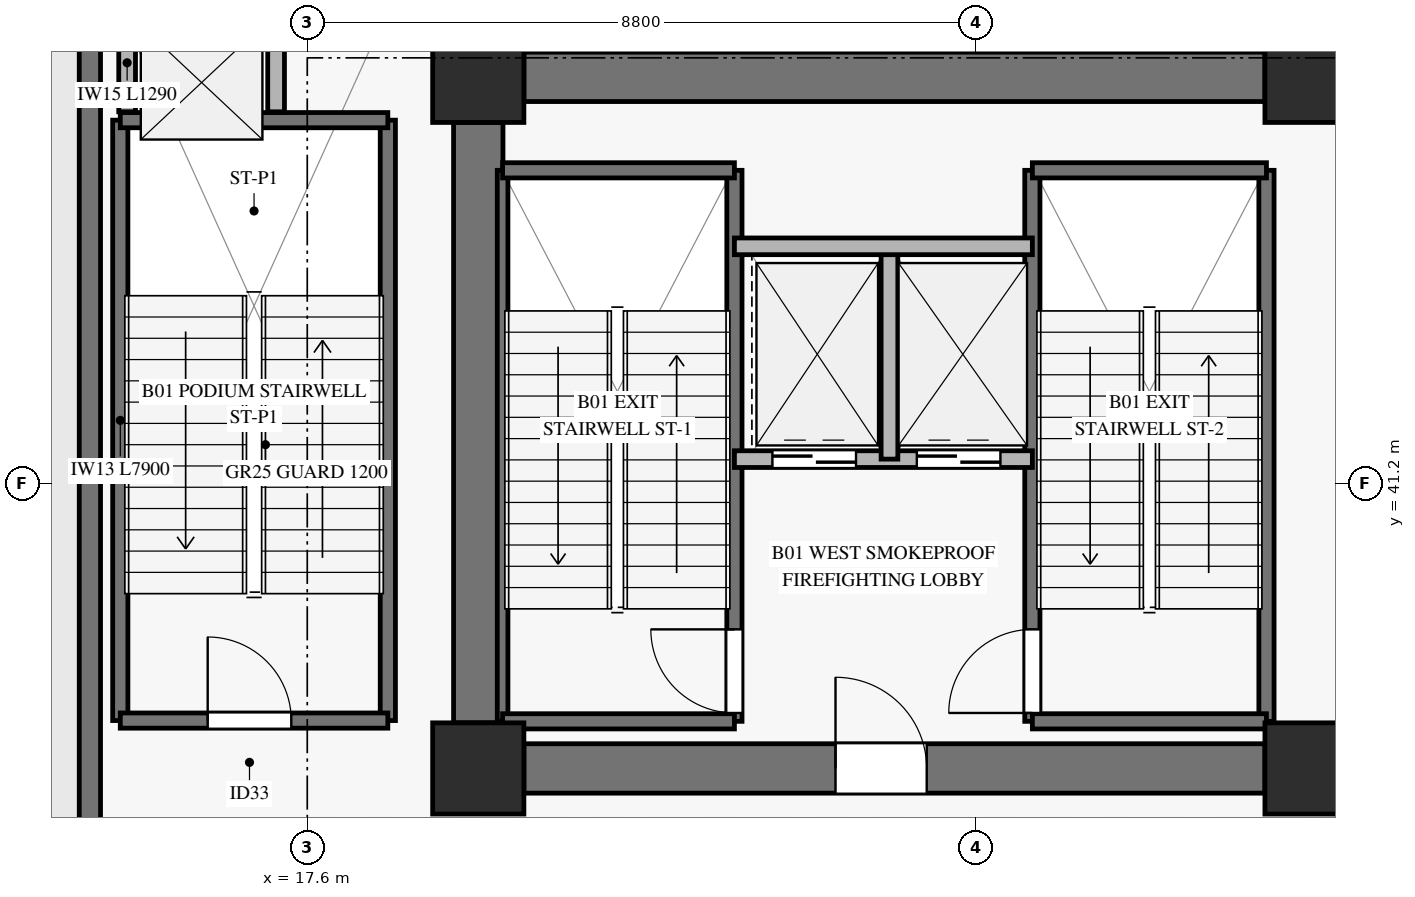
"""IFC4 building model, lengths in metres.
Left out: names, types, materials, properties, quantities, classifications, styles, units other than length and angle.
Written with IfcOpenShell. Run it as: python <this file> out.ifc"""

import sys

from ifc_helpers import new_model, si_unit, direction, frame, frame_2d, origin, origin_2d, place, context, subcontext, project, spatial, rectangle, extrude, source, transform, mapped, element, fill, save


model = new_model("IFC4")
c1 = context("Model", 3, precision=1e-05, world=origin(), true_north=direction((0.0, 1.0)))
c2 = subcontext(c1, "Body", "Model", "MODEL_VIEW")
j1 = project(units=[si_unit("LENGTHUNIT", "METRE"), si_unit("PLANEANGLEUNIT", "RADIAN")], contexts=[c1])
p1 = place(None, origin())
s1 = spatial("IfcSite", under=j1, at=p1, CompositionType="ELEMENT")
p2 = place(p1, origin())
s2 = spatial("IfcBuilding", under=s1, at=p2, CompositionType="ELEMENT")
p3 = place(p2, frame((0.0, 0.0, -5.2)))
s3 = spatial("IfcBuildingStorey", under=s2, at=p3, CompositionType="ELEMENT", Elevation=-5.2)
m1 = source(origin(), c2, "Body", "SweptSolid", [
    extrude(rectangle(XDim=1.2, YDim=1.2, at=origin_2d()), origin(), (0.0, 0.0, 1.0), 4.94),
])
for number, where, z_axis, x_axis in (
    (1, (19.85, 37.45, 0.0), (0.0, 0.0, 1.0), (1.0, 0.0, 0.0)),
    (2, (19.85, 46.55, 0.0), (0.0, 0.0, 1.0), (1.0, 0.0, 0.0)),
    (3, (30.8, 37.45, 0.0), (0.0, 0.0, 1.0), (1.0, 0.0, 0.0)),
    (4, (30.8, 46.55, 0.0), (0.0, 0.0, 1.0), (1.0, 0.0, 0.0)),
):
    element("IfcColumn", number, at=place(p3, frame(where, z_axis=z_axis, x_axis=x_axis)), inside=s3, PredefinedType="PILASTER", context=c2, shape_type="MappedRepresentation", body=[
        mapped(m1, transform((0.0, 0.0, 0.0), x_axis=(1.0, 0.0, 0.0), y_axis=(0.0, 1.0, 0.0), z_axis=(0.0, 0.0, 1.0), scale=1.0)),
    ])
p4 = place(p3, frame((20.45, 46.55, 0.0), z_axis=(0.0, 0.0, 1.0), x_axis=(1.0, 0.0, 0.0)))
e5 = element("IfcWall", 5, at=p4, inside=s3, PredefinedType="SHEAR", context=c2, shape_type="SweptSolid", body=[
    extrude(rectangle(XDim=9.75, YDim=0.65, at=frame_2d((4.875, 0.0))), origin(), (0.0, 0.0, 1.0), 4.94),
])
p5 = place(p3, frame((20.45, 37.45, 0.0), z_axis=(0.0, 0.0, 1.0), x_axis=(1.0, 0.0, 0.0)))
e6 = element("IfcWall", 6, at=p5, inside=s3, PredefinedType="SHEAR", context=c2, shape_type="SweptSolid", body=[
    extrude(rectangle(XDim=9.75, YDim=0.65, at=frame_2d((4.875, 0.0))), origin(), (0.0, 0.0, 1.0), 4.94),
])
p6 = place(p5, frame((4.1, 0.0, 0.0)))
e7 = element("IfcOpeningElement", 7, at=p6, cuts=e6, PredefinedType="OPENING", context=c2, shape_type="SweptSolid", body=[
    extrude(rectangle(XDim=1.2, YDim=2.15, at=frame_2d((0.6, 1.075))), frame((0.0, 0.335, 0.0), z_axis=(0.0, -1.0, 0.0), x_axis=(1.0, 0.0, 0.0)), (0.0, 0.0, 1.0), 0.67),
])
p7 = place(p3, frame((19.85, 38.05, 0.0), z_axis=(0.0, 0.0, 1.0), x_axis=(0.0, 1.0, 0.0)))
e8 = element("IfcWall", 8, at=p7, inside=s3, PredefinedType="SHEAR", context=c2, shape_type="SweptSolid", body=[
    extrude(rectangle(XDim=7.9, YDim=0.65, at=frame_2d((3.95, 0.0))), origin(), (0.0, 0.0, 1.0), 4.94),
])
p8 = place(p3, frame((14.74, 6.76, 0.0), z_axis=(0.0, 0.0, 1.0), x_axis=(0.0, 1.0, 0.0)))
e9 = element("IfcWall", 9, at=p8, inside=s3, PredefinedType="SOLIDWALL", context=c2, shape_type="SweptSolid", body=[
    extrude(rectangle(XDim=42.0, YDim=0.28, at=frame_2d((21.0, 0.0))), origin(), (0.0, 0.0, 1.0), 5.2),
])
p9 = place(p3, frame((20.17, 38.07, 0.0), z_axis=(0.0, 0.0, 1.0), x_axis=(0.0, 1.0, 0.0)))
e10 = element("IfcWall", 10, at=p9, inside=s3, PredefinedType="SOLIDWALL", context=c2, shape_type="SweptSolid", body=[
    extrude(rectangle(XDim=7.25, YDim=0.14, at=frame_2d((3.625, 0.0))), origin(), (0.0, 0.0, 1.0), 5.2),
])
p10 = place(p3, frame((23.22, 38.07, 0.0), z_axis=(0.0, 0.0, 1.0), x_axis=(0.0, 1.0, 0.0)))
e11 = element("IfcWall", 11, at=p10, inside=s3, PredefinedType="SOLIDWALL", context=c2, shape_type="SweptSolid", body=[
    extrude(rectangle(XDim=7.25, YDim=0.2, at=frame_2d((3.625, 0.0))), origin(), (0.0, 0.0, 1.0), 5.2),
])
p11 = place(p10, frame((0.11, 0.0, 0.0)))
e12 = element("IfcOpeningElement", 12, at=p11, cuts=e11, PredefinedType="OPENING", context=c2, shape_type="SweptSolid", body=[
    extrude(rectangle(XDim=1.1, YDim=2.15, at=frame_2d((0.55, 1.075))), frame((0.0, 0.11, 0.0), z_axis=(0.0, -1.0, 0.0), x_axis=(1.0, 0.0, 0.0)), (0.0, 0.0, 1.0), 0.22),
])
for number, where, z_axis, x_axis in (
    (13, (20.17, 45.32, 0.0), (0.0, 0.0, 1.0), (1.0, 0.0, 0.0)),
    (14, (20.17, 38.07, 0.0), (0.0, 0.0, 1.0), (1.0, 0.0, 0.0)),
):
    element("IfcWall", number, at=place(p3, frame(where, z_axis=z_axis, x_axis=x_axis)), inside=s3, PredefinedType="SOLIDWALL", context=c2, shape_type="SweptSolid", body=[
        extrude(rectangle(XDim=3.05, YDim=0.2, at=frame_2d((1.525, 0.0))), origin(), (0.0, 0.0, 1.0), 5.2),
    ])
p12 = place(p3, frame((27.14, 38.07, 0.0), z_axis=(0.0, 0.0, 1.0), x_axis=(0.0, 1.0, 0.0)))
e15 = element("IfcWall", 15, at=p12, inside=s3, PredefinedType="SOLIDWALL", context=c2, shape_type="SweptSolid", body=[
    extrude(rectangle(XDim=7.25, YDim=0.2, at=frame_2d((3.625, 0.0))), origin(), (0.0, 0.0, 1.0), 5.2),
])
p13 = place(p12, frame((0.11, 0.0, 0.0)))
e16 = element("IfcOpeningElement", 16, at=p13, cuts=e15, PredefinedType="OPENING", context=c2, shape_type="SweptSolid", body=[
    extrude(rectangle(XDim=1.1, YDim=2.15, at=frame_2d((0.55, 1.075))), frame((0.0, 0.11, 0.0), z_axis=(0.0, -1.0, 0.0), x_axis=(1.0, 0.0, 0.0)), (0.0, 0.0, 1.0), 0.22),
])
p14 = place(p3, frame((30.22, 38.07, 0.0), z_axis=(0.0, 0.0, 1.0), x_axis=(0.0, 1.0, 0.0)))
e17 = element("IfcWall", 17, at=p14, inside=s3, PredefinedType="SOLIDWALL", context=c2, shape_type="SweptSolid", body=[
    extrude(rectangle(XDim=7.25, YDim=0.2, at=frame_2d((3.625, 0.0))), origin(), (0.0, 0.0, 1.0), 5.2),
])
for number, where, z_axis, x_axis in (
    (18, (27.14, 45.32, 0.0), (0.0, 0.0, 1.0), (1.0, 0.0, 0.0)),
    (19, (27.14, 38.07, 0.0), (0.0, 0.0, 1.0), (1.0, 0.0, 0.0)),
):
    element("IfcWall", number, at=place(p3, frame(where, z_axis=z_axis, x_axis=x_axis)), inside=s3, PredefinedType="SOLIDWALL", context=c2, shape_type="SweptSolid", body=[
        extrude(rectangle(XDim=3.08, YDim=0.2, at=frame_2d((1.54, 0.0))), origin(), (0.0, 0.0, 1.0), 5.2),
    ])
p15 = place(p3, frame((23.22, 41.52, 0.0), z_axis=(0.0, 0.0, 1.0), x_axis=(1.0, 0.0, 0.0)))
e20 = element("IfcWall", 20, at=p15, inside=s3, PredefinedType="SOLIDWALL", context=c2, shape_type="SweptSolid", body=[
    extrude(rectangle(XDim=3.92, YDim=0.22, at=frame_2d((1.96, 0.0))), origin(), (0.0, 0.0, 1.0), 4.94),
])
p16 = place(p15, frame((0.5, 0.0, 0.0)))
e21 = element("IfcOpeningElement", 21, at=p16, cuts=e20, PredefinedType="OPENING", context=c2, shape_type="SweptSolid", body=[
    extrude(rectangle(XDim=1.1, YDim=2.2, at=frame_2d((0.55, 1.1))), frame((0.0, 0.12, 0.0), z_axis=(0.0, -1.0, 0.0), x_axis=(1.0, 0.0, 0.0)), (0.0, 0.0, 1.0), 0.24),
])
p17 = place(p15, frame((2.4, 0.0, 0.0)))
e22 = element("IfcOpeningElement", 22, at=p17, cuts=e20, PredefinedType="OPENING", context=c2, shape_type="SweptSolid", body=[
    extrude(rectangle(XDim=1.1, YDim=2.2, at=frame_2d((0.55, 1.1))), frame((0.0, 0.12, 0.0), z_axis=(0.0, -1.0, 0.0), x_axis=(1.0, 0.0, 0.0)), (0.0, 0.0, 1.0), 0.24),
])
p18 = place(p3, frame((25.26, 41.52, 0.0), z_axis=(0.0, 0.0, 1.0), x_axis=(0.0, 1.0, 0.0)))
e23 = element("IfcWall", 23, at=p18, inside=s3, PredefinedType="SOLIDWALL", context=c2, shape_type="SweptSolid", body=[
    extrude(rectangle(XDim=2.8, YDim=0.22, at=frame_2d((1.4, 0.0))), origin(), (0.0, 0.0, 1.0), 4.94),
])
p19 = place(p3, frame((23.22, 44.32, 0.0), z_axis=(0.0, 0.0, 1.0), x_axis=(1.0, 0.0, 0.0)))
e24 = element("IfcWall", 24, at=p19, inside=s3, PredefinedType="SOLIDWALL", context=c2, shape_type="SweptSolid", body=[
    extrude(rectangle(XDim=3.92, YDim=0.22, at=frame_2d((1.96, 0.0))), origin(), (0.0, 0.0, 1.0), 4.94),
])
for number, where, z_axis, x_axis in (
    (25, (15.14, 38.08, 0.0), (0.0, 0.0, 1.0), (0.0, 1.0, 0.0)),
    (26, (18.66, 38.08, 0.0), (0.0, 0.0, 1.0), (0.0, 1.0, 0.0)),
):
    element("IfcWall", number, at=place(p3, frame(where, z_axis=z_axis, x_axis=x_axis)), inside=s3, PredefinedType="SOLIDWALL", context=c2, shape_type="SweptSolid", body=[
        extrude(rectangle(XDim=7.9, YDim=0.2, at=frame_2d((3.95, 0.0))), origin(), (0.0, 0.0, 1.0), 5.2),
    ])
p20 = place(p3, frame((15.14, 45.98, 0.0), z_axis=(0.0, 0.0, 1.0), x_axis=(1.0, 0.0, 0.0)))
e27 = element("IfcWall", 27, at=p20, inside=s3, PredefinedType="SOLIDWALL", context=c2, shape_type="SweptSolid", body=[
    extrude(rectangle(XDim=3.52, YDim=0.2, at=frame_2d((1.76, 0.0))), origin(), (0.0, 0.0, 1.0), 5.2),
])
p21 = place(p3, frame((15.14, 38.08, 0.0), z_axis=(0.0, 0.0, 1.0), x_axis=(1.0, 0.0, 0.0)))
e28 = element("IfcWall", 28, at=p21, inside=s3, PredefinedType="SOLIDWALL", context=c2, shape_type="SweptSolid", body=[
    extrude(rectangle(XDim=3.52, YDim=0.2, at=frame_2d((1.76, 0.0))), origin(), (0.0, 0.0, 1.0), 5.2),
])
p22 = place(p21, frame((1.15, 0.0, 0.0)))
e29 = element("IfcOpeningElement", 29, at=p22, cuts=e28, PredefinedType="OPENING", context=c2, shape_type="SweptSolid", body=[
    extrude(rectangle(XDim=1.1, YDim=2.15, at=frame_2d((0.55, 1.075))), frame((0.0, 0.11, 0.0), z_axis=(0.0, -1.0, 0.0), x_axis=(1.0, 0.0, 0.0)), (0.0, 0.0, 1.0), 0.22),
])
for number, where, z_axis, x_axis in (
    (30, (15.23, 46.09, 0.0), (0.0, 0.0, 1.0), (0.0, 1.0, 0.0)),
    (31, (17.19, 46.09, 0.0), (0.0, 0.0, 1.0), (0.0, 1.0, 0.0)),
):
    element("IfcWall", number, at=place(p3, frame(where, z_axis=z_axis, x_axis=x_axis)), inside=s3, PredefinedType="SOLIDWALL", context=c2, shape_type="SweptSolid", body=[
        extrude(rectangle(XDim=1.29, YDim=0.22, at=frame_2d((0.645, 0.0))), origin(), (0.0, 0.0, 1.0), 4.94),
    ])
m2 = source(origin(), c2, "Body", "SweptSolid", [
    extrude(rectangle(XDim=1.1, YDim=2.15, at=frame_2d((0.55, 1.075))), frame((0.0, 0.025, 0.0), z_axis=(0.0, -1.0, 0.0), x_axis=(1.0, 0.0, 0.0)), (0.0, 0.0, 1.0), 0.05),
])
p23 = place(p11, origin())
e32 = element("IfcDoor", 32, at=p23, inside=s3, OperationType="SINGLE_SWING_RIGHT", PredefinedType="DOOR", context=c2, shape_type="MappedRepresentation", body=[
    mapped(m2, transform((0.0, 0.0, 0.0), x_axis=(1.0, 0.0, 0.0), y_axis=(0.0, 1.0, 0.0), z_axis=(0.0, 0.0, 1.0), scale=1.0)),
])
fill(e12, e32)
p24 = place(p13, origin())
e33 = element("IfcDoor", 33, at=p24, inside=s3, OperationType="SINGLE_SWING_LEFT", PredefinedType="DOOR", context=c2, shape_type="MappedRepresentation", body=[
    mapped(m2, transform((0.0, 0.0, 0.0), x_axis=(1.0, 0.0, 0.0), y_axis=(0.0, 1.0, 0.0), z_axis=(0.0, 0.0, 1.0), scale=1.0)),
])
fill(e16, e33)
m3 = source(origin(), c2, "Body", "SweptSolid", [
    extrude(rectangle(XDim=1.1, YDim=2.2, at=frame_2d((0.55, 1.1))), frame((0.0, 0.025, 0.0), z_axis=(0.0, -1.0, 0.0), x_axis=(1.0, 0.0, 0.0)), (0.0, 0.0, 1.0), 0.05),
])
p25 = place(p16, origin())
e34 = element("IfcDoor", 34, at=p25, inside=s3, OperationType="SLIDING_TO_LEFT", PredefinedType="DOOR", context=c2, shape_type="MappedRepresentation", body=[
    mapped(m3, transform((0.0, 0.0, 0.0), x_axis=(1.0, 0.0, 0.0), y_axis=(0.0, 1.0, 0.0), z_axis=(0.0, 0.0, 1.0), scale=1.0)),
])
fill(e21, e34)
p26 = place(p17, origin())
e35 = element("IfcDoor", 35, at=p26, inside=s3, OperationType="SLIDING_TO_LEFT", PredefinedType="DOOR", context=c2, shape_type="MappedRepresentation", body=[
    mapped(m3, transform((0.0, 0.0, 0.0), x_axis=(1.0, 0.0, 0.0), y_axis=(0.0, 1.0, 0.0), z_axis=(0.0, 0.0, 1.0), scale=1.0)),
])
fill(e22, e35)
m4 = source(origin(), c2, "Body", "SweptSolid", [
    extrude(rectangle(XDim=1.2, YDim=2.15, at=frame_2d((0.6, 1.075))), frame((0.0, 0.025, 0.0), z_axis=(0.0, -1.0, 0.0), x_axis=(1.0, 0.0, 0.0)), (0.0, 0.0, 1.0), 0.05),
])
p27 = place(p6, origin())
e36 = element("IfcDoor", 36, at=p27, inside=s3, OperationType="SINGLE_SWING_LEFT", PredefinedType="DOOR", context=c2, shape_type="MappedRepresentation", body=[
    mapped(m4, transform((0.0, 0.0, 0.0), x_axis=(1.0, 0.0, 0.0), y_axis=(0.0, 1.0, 0.0), z_axis=(0.0, 0.0, 1.0), scale=1.0)),
])
fill(e7, e36)
p28 = place(p22, origin())
e37 = element("IfcDoor", 37, at=p28, inside=s3, OperationType="SINGLE_SWING_LEFT", PredefinedType="DOOR", context=c2, shape_type="MappedRepresentation", body=[
    mapped(m2, transform((0.0, 0.0, 0.0), x_axis=(1.0, 0.0, 0.0), y_axis=(0.0, 1.0, 0.0), z_axis=(0.0, 0.0, 1.0), scale=1.0)),
])
fill(e29, e37)
save(model, sys.argv[1])
